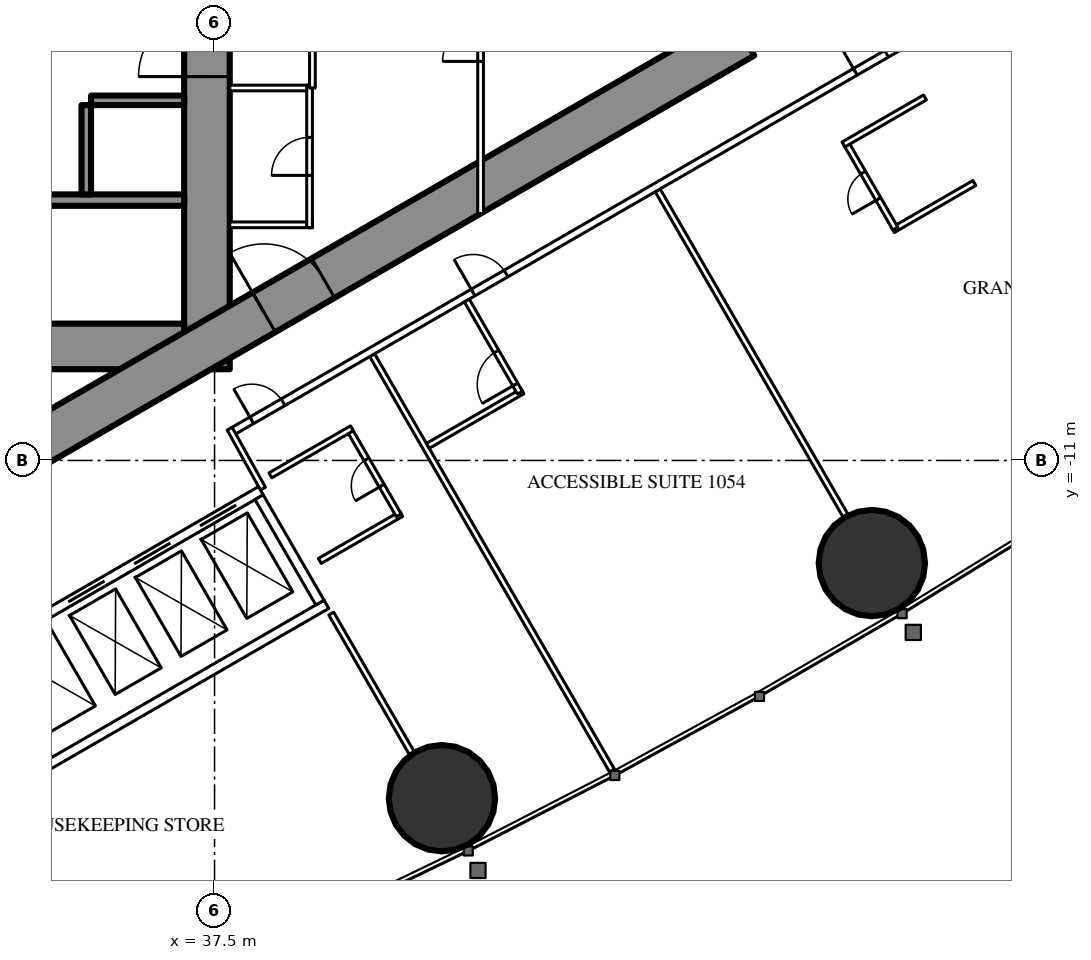
"""IFC4 building model, lengths in metres.
Left out: names, types, materials, properties, quantities, classifications, styles, units other than length and angle.
Written with IfcOpenShell. Run it as: python <this file> out.ifc"""

import sys

from ifc_helpers import new_model, si_unit, direction, frame, frame_2d, origin, origin_2d, place, context, subcontext, project, spatial, rectangle, hollow_circle, extrude, element, fill, save


model = new_model("IFC4")
c1 = context("Model", 3, precision=1e-05, world=origin(), true_north=direction((0.0, 1.0)))
c2 = subcontext(c1, "Body", "Model", "MODEL_VIEW")
j1 = project(units=[si_unit("LENGTHUNIT", "METRE"), si_unit("PLANEANGLEUNIT", "RADIAN")], contexts=[c1])
p1 = place(None, origin())
s1 = spatial("IfcSite", under=j1, at=p1, CompositionType="ELEMENT")
p2 = place(p1, origin())
s2 = spatial("IfcBuilding", under=s1, at=p2, CompositionType="ELEMENT")
p3 = place(p2, frame((0.0, 0.0, 42.5)))
s3 = spatial("IfcBuildingStorey", under=s2, at=p3, CompositionType="ELEMENT", Elevation=42.5)
for number, where, z_axis, x_axis in (
    (1, (43.484, -19.886, 0.0), (0.0, 0.0, 1.0), (1.0, 0.0, 0.0)),
    (2, (54.795, -13.701, 0.0), (0.0, 0.0, 1.0), (1.0, 0.0, 0.0)),
):
    element("IfcColumn", number, at=place(p3, frame(where, z_axis=z_axis, x_axis=x_axis)), inside=s3, PredefinedType="COLUMN", context=c2, shape_type="SweptSolid", body=[
        extrude(hollow_circle(Radius=1.4, WallThickness=0.12, at=origin_2d()), origin(), (0.0, 0.0, 1.0), 3.5),
    ])
p4 = place(p3, frame((37.3, -8.6, 0.0), z_axis=(0.0, 0.0, 1.0), x_axis=(0.0, 1.0, 0.0)))
e3 = element("IfcWall", 3, at=p4, inside=s3, PredefinedType="SHEAR", context=c2, shape_type="SweptSolid", body=[
    extrude(rectangle(XDim=17.2, YDim=1.2, at=frame_2d((8.6, 0.0))), origin(), (0.0, 0.0, 1.0), 3.5),
])
p5 = place(p4, frame((7.7, 0.0, 0.0)))
e4 = element("IfcOpeningElement", 4, at=p5, cuts=e3, PredefinedType="OPENING", context=c2, shape_type="SweptSolid", body=[
    extrude(rectangle(XDim=1.8, YDim=2.2, at=frame_2d((0.9, 1.1))), frame((0.0, 0.61, 0.0), z_axis=(0.0, -1.0, 0.0), x_axis=(1.0, 0.0, 0.0)), (0.0, 0.0, 1.0), 1.22),
])
p6 = place(p3, frame((28.3, -8.0, 0.0), z_axis=(0.0, 0.0, 1.0), x_axis=(1.0, 0.0, 0.0)))
e5 = element("IfcWall", 5, at=p6, inside=s3, PredefinedType="SHEAR", context=c2, shape_type="SweptSolid", body=[
    extrude(rectangle(XDim=8.4, YDim=1.2, at=frame_2d((4.2, 0.0))), origin(), (0.0, 0.0, 1.0), 3.5),
])
p7 = place(p6, frame((0.25, 0.0, 0.0)))
e6 = element("IfcOpeningElement", 6, at=p7, cuts=e5, PredefinedType="OPENING", context=c2, shape_type="SweptSolid", body=[
    extrude(rectangle(XDim=1.0, YDim=2.2, at=frame_2d((0.5, 1.1))), frame((0.0, 0.61, 0.0), z_axis=(0.0, -1.0, 0.0), x_axis=(1.0, 0.0, 0.0)), (0.0, 0.0, 1.0), 1.22),
])
p8 = place(p3, frame((28.3, -4.15, 0.0), z_axis=(0.0, 0.0, 1.0), x_axis=(1.0, 0.0, 0.0)))
e7 = element("IfcWall", 7, at=p8, inside=s3, PredefinedType="SHEAR", context=c2, shape_type="SweptSolid", body=[
    extrude(rectangle(XDim=8.4, YDim=0.3, at=frame_2d((4.2, 0.0))), origin(), (0.0, 0.0, 1.0), 3.5),
])
p9 = place(p3, frame((34.125, -4.0, 0.0), z_axis=(0.0, 0.0, 1.0), x_axis=(0.0, 1.0, 0.0)))
e8 = element("IfcWall", 8, at=p9, inside=s3, PredefinedType="SHEAR", context=c2, shape_type="SweptSolid", body=[
    extrude(rectangle(XDim=2.35, YDim=0.25, at=frame_2d((1.175, 0.0))), origin(), (0.0, 0.0, 1.0), 3.5),
])
p10 = place(p3, frame((34.25, -1.525, 0.0), z_axis=(0.0, 0.0, 1.0), x_axis=(1.0, 0.0, 0.0)))
e9 = element("IfcWall", 9, at=p10, inside=s3, PredefinedType="SHEAR", context=c2, shape_type="SweptSolid", body=[
    extrude(rectangle(XDim=2.45, YDim=0.25, at=frame_2d((1.225, 0.0))), origin(), (0.0, 0.0, 1.0), 3.5),
])
p11 = place(p3, frame((27.2, -13.8, 0.0), z_axis=(0.0, 0.0, 1.0), x_axis=(0.866027159892, 0.499996958321, 0.0)))
e10 = element("IfcWall", 10, at=p11, inside=s3, PredefinedType="SHEAR", context=c2, shape_type="SweptSolid", body=[
    extrude(rectangle(XDim=27.947, YDim=1.2, at=frame_2d((13.973, 0.0))), origin(), (0.0, 0.0, 1.0), 3.5),
])
p12 = place(p11, frame((4.6, 0.0, 0.0)))
e11 = element("IfcOpeningElement", 11, at=p12, cuts=e10, PredefinedType="OPENING", context=c2, shape_type="SweptSolid", body=[
    extrude(rectangle(XDim=1.0, YDim=2.2, at=frame_2d((0.5, 1.1))), frame((0.0, 0.61, 0.0), z_axis=(0.0, -1.0, 0.0), x_axis=(1.0, 0.0, 0.0)), (0.0, 0.0, 1.0), 1.22),
])
p13 = place(p11, frame((13.395, 0.0, 0.0)))
e12 = element("IfcOpeningElement", 12, at=p13, cuts=e10, PredefinedType="OPENING", context=c2, shape_type="SweptSolid", body=[
    extrude(rectangle(XDim=1.8, YDim=2.2, at=frame_2d((0.9, 1.1))), frame((0.0, 0.61, 0.0), z_axis=(0.0, -1.0, 0.0), x_axis=(1.0, 0.0, 0.0)), (0.0, 0.0, 1.0), 1.22),
])
p14 = place(p3, frame((41.647, -8.23, 0.0), z_axis=(0.0, 0.0, 1.0), x_axis=(0.49998590462, -0.866033541603, 0.0)))
e13 = element("IfcWall", 13, at=p14, inside=s3, PredefinedType="PARTITIONING", context=c2, shape_type="SweptSolid", body=[
    extrude(rectangle(XDim=12.621, YDim=0.15, at=frame_2d((6.311, 0.0))), origin(), (0.0, 0.0, 1.0), 3.25),
])
p15 = place(p3, frame((49.159, -3.893, 0.0), z_axis=(0.0, 0.0, 1.0), x_axis=(0.499998773722, -0.866026111775, 0.0)))
e14 = element("IfcWall", 14, at=p15, inside=s3, PredefinedType="PARTITIONING", context=c2, shape_type="SweptSolid", body=[
    extrude(rectangle(XDim=9.892, YDim=0.15, at=frame_2d((4.946, 0.0))), origin(), (0.0, 0.0, 1.0), 2.25),
])
p16 = place(p3, frame((40.57, -15.03, 0.0), z_axis=(0.0, 0.0, 1.0), x_axis=(0.500012993597, -0.866017901798, 0.0)))
e15 = element("IfcWall", 15, at=p16, inside=s3, PredefinedType="PARTITIONING", context=c2, shape_type="SweptSolid", body=[
    extrude(rectangle(XDim=4.243, YDim=0.15, at=frame_2d((2.122, 0.0))), origin(), (0.0, 0.0, 1.0), 3.25),
])
p17 = place(p3, frame((37.96, -10.243, 0.0), z_axis=(0.0, 0.0, 1.0), x_axis=(0.866026429433, 0.499998223521, 0.0)))
e16 = element("IfcWall", 16, at=p17, inside=s3, PredefinedType="PARTITIONING", context=c2, shape_type="SweptSolid", body=[
    extrude(rectangle(XDim=20.487, YDim=0.2, at=frame_2d((10.243, 0.0))), origin(), (0.0, 0.0, 1.0), 3.25),
])
p18 = place(p17, frame((7.325, 0.0, 0.0)))
e17 = element("IfcOpeningElement", 17, at=p18, cuts=e16, PredefinedType="OPENING", context=c2, shape_type="SweptSolid", body=[
    extrude(rectangle(XDim=1.0, YDim=2.2, at=frame_2d((0.5, 1.1))), frame((0.0, 0.11, 0.0), z_axis=(0.0, -1.0, 0.0), x_axis=(1.0, 0.0, 0.0)), (0.0, 0.0, 1.0), 0.22),
])
p19 = place(p17, frame((18.937, 0.0, 0.0)))
e18 = element("IfcOpeningElement", 18, at=p19, cuts=e16, PredefinedType="OPENING", context=c2, shape_type="SweptSolid", body=[
    extrude(rectangle(XDim=0.95, YDim=2.2, at=frame_2d((0.475, 1.1))), frame((0.0, 0.11, 0.0), z_axis=(0.0, -1.0, 0.0), x_axis=(1.0, 0.0, 0.0)), (0.0, 0.0, 1.0), 0.22),
])
p20 = place(p17, frame((0.6, 0.0, 0.0)))
e19 = element("IfcOpeningElement", 19, at=p20, cuts=e16, PredefinedType="OPENING", context=c2, shape_type="SweptSolid", body=[
    extrude(rectangle(XDim=0.95, YDim=2.2, at=frame_2d((0.475, 1.1))), frame((0.0, 0.11, 0.0), z_axis=(0.0, -1.0, 0.0), x_axis=(1.0, 0.0, 0.0)), (0.0, 0.0, 1.0), 0.22),
])
p21 = place(p3, frame((38.773, -11.742, 0.0), z_axis=(0.0, 0.0, 1.0), x_axis=(-0.485528096672, 0.8742210632, 0.0)))
e20 = element("IfcWall", 20, at=p21, inside=s3, PredefinedType="PARTITIONING", context=c2, shape_type="SweptSolid", body=[
    extrude(rectangle(XDim=1.805, YDim=0.15, at=frame_2d((0.903, 0.0))), origin(), (0.0, 0.0, 1.0), 3.25),
])
p22 = place(p3, frame((43.112, -10.617, 0.0), z_axis=(0.0, 0.0, 1.0), x_axis=(0.866018712932, 0.500011588718, 0.0)))
e21 = element("IfcWall", 21, at=p22, inside=s3, PredefinedType="PARTITIONING", context=c2, shape_type="SweptSolid", body=[
    extrude(rectangle(XDim=2.875, YDim=0.15, at=frame_2d((1.438, 0.0))), origin(), (0.0, 0.0, 1.0), 3.25),
])
p23 = place(p3, frame((44.137, -6.792, 0.0), z_axis=(0.0, 0.0, 1.0), x_axis=(0.49994636267, -0.866056369097, 0.0)))
e22 = element("IfcWall", 22, at=p23, inside=s3, PredefinedType="PARTITIONING", context=c2, shape_type="SweptSolid", body=[
    extrude(rectangle(XDim=2.8, YDim=0.15, at=frame_2d((1.4, 0.0))), origin(), (0.0, 0.0, 1.0), 3.25),
])
p24 = place(p23, frame((1.55, 0.0, 0.0)))
e23 = element("IfcOpeningElement", 23, at=p24, cuts=e22, PredefinedType="OPENING", context=c2, shape_type="SweptSolid", body=[
    extrude(rectangle(XDim=1.0, YDim=2.2, at=frame_2d((0.5, 1.1))), frame((0.0, 0.085, 0.0), z_axis=(0.0, -1.0, 0.0), x_axis=(1.0, 0.0, 0.0)), (0.0, 0.0, 1.0), 0.17),
])
p25 = place(p3, frame((55.349, -4.938, 0.0), z_axis=(0.0, 0.0, 1.0), x_axis=(0.866006523861, 0.500032699561, 0.0)))
e24 = element("IfcWall", 24, at=p25, inside=s3, PredefinedType="PARTITIONING", context=c2, shape_type="SweptSolid", body=[
    extrude(rectangle(XDim=2.475, YDim=0.15, at=frame_2d((1.237, 0.0))), origin(), (0.0, 0.0, 1.0), 3.25),
])
p26 = place(p3, frame((54.114, -2.649, 0.0), z_axis=(0.0, 0.0, 1.0), x_axis=(0.500006934395, -0.866021400173, 0.0)))
e25 = element("IfcWall", 25, at=p26, inside=s3, PredefinedType="PARTITIONING", context=c2, shape_type="SweptSolid", body=[
    extrude(rectangle(XDim=2.6, YDim=0.15, at=frame_2d((1.3, 0.0))), origin(), (0.0, 0.0, 1.0), 3.25),
])
p27 = place(p26, frame((0.9, 0.0, 0.0)))
e26 = element("IfcOpeningElement", 26, at=p27, cuts=e25, PredefinedType="OPENING", context=c2, shape_type="SweptSolid", body=[
    extrude(rectangle(XDim=0.8, YDim=2.2, at=frame_2d((0.4, 1.1))), frame((0.0, 0.085, 0.0), z_axis=(0.0, -1.0, 0.0), x_axis=(1.0, 0.0, 0.0)), (0.0, 0.0, 1.0), 0.17),
])
p28 = place(p3, frame((54.049, -2.687, 0.0), z_axis=(0.0, 0.0, 1.0), x_axis=(0.866006523861, 0.500032699561, 0.0)))
e27 = element("IfcWall", 27, at=p28, inside=s3, PredefinedType="PARTITIONING", context=c2, shape_type="SweptSolid", body=[
    extrude(rectangle(XDim=2.475, YDim=0.15, at=frame_2d((1.237, 0.0))), origin(), (0.0, 0.0, 1.0), 3.25),
])
p29 = place(p3, frame((40.27, -13.644, 0.0), z_axis=(0.0, 0.0, 1.0), x_axis=(0.866031185235, 0.4999899861, 0.0)))
e28 = element("IfcWall", 28, at=p29, inside=s3, PredefinedType="PARTITIONING", context=c2, shape_type="SweptSolid", body=[
    extrude(rectangle(XDim=2.475, YDim=0.15, at=frame_2d((1.238, 0.0))), origin(), (0.0, 0.0, 1.0), 3.25),
])
p30 = place(p3, frame((41.048, -10.193, 0.0), z_axis=(0.0, 0.0, 1.0), x_axis=(0.500047596559, -0.865997922154, 0.0)))
e29 = element("IfcWall", 29, at=p30, inside=s3, PredefinedType="PARTITIONING", context=c2, shape_type="SweptSolid", body=[
    extrude(rectangle(XDim=2.6, YDim=0.15, at=frame_2d((1.3, 0.0))), origin(), (0.0, 0.0, 1.0), 3.25),
])
p31 = place(p30, frame((0.9, 0.0, 0.0)))
e30 = element("IfcOpeningElement", 30, at=p31, cuts=e29, PredefinedType="OPENING", context=c2, shape_type="SweptSolid", body=[
    extrude(rectangle(XDim=0.8, YDim=2.2, at=frame_2d((0.4, 1.1))), frame((0.0, 0.085, 0.0), z_axis=(0.0, -1.0, 0.0), x_axis=(1.0, 0.0, 0.0)), (0.0, 0.0, 1.0), 0.17),
])
p32 = place(p3, frame((38.97, -11.393, 0.0), z_axis=(0.0, 0.0, 1.0), x_axis=(0.866031185235, 0.4999899861, 0.0)))
e31 = element("IfcWall", 31, at=p32, inside=s3, PredefinedType="PARTITIONING", context=c2, shape_type="SweptSolid", body=[
    extrude(rectangle(XDim=2.475, YDim=0.15, at=frame_2d((1.238, 0.0))), origin(), (0.0, 0.0, 1.0), 3.25),
])
for number, where, z_axis, x_axis in (
    (32, (37.9, -1.2, 0.0), (0.0, 0.0, 1.0), (1.0, 0.0, 0.0)),
    (33, (37.9, -4.8, 0.0), (0.0, 0.0, 1.0), (1.0, 0.0, 0.0)),
):
    element("IfcWall", number, at=place(p3, frame(where, z_axis=z_axis, x_axis=x_axis)), inside=s3, PredefinedType="PARTITIONING", context=c2, shape_type="SweptSolid", body=[
        extrude(rectangle(XDim=2.175, YDim=0.15, at=frame_2d((1.087, 0.0))), origin(), (0.0, 0.0, 1.0), 3.25),
    ])
p33 = place(p3, frame((40.0, -4.875, 0.0), z_axis=(0.0, 0.0, 1.0), x_axis=(0.0, 1.0, 0.0)))
e34 = element("IfcWall", 34, at=p33, inside=s3, PredefinedType="PARTITIONING", context=c2, shape_type="SweptSolid", body=[
    extrude(rectangle(XDim=3.75, YDim=0.15, at=frame_2d((1.875, 0.0))), origin(), (0.0, 0.0, 1.0), 3.25),
])
p34 = place(p33, frame((1.375, 0.0, 0.0)))
e35 = element("IfcOpeningElement", 35, at=p34, cuts=e34, PredefinedType="OPENING", context=c2, shape_type="SweptSolid", body=[
    extrude(rectangle(XDim=1.0, YDim=2.2, at=frame_2d((0.5, 1.1))), frame((0.0, 0.085, 0.0), z_axis=(0.0, -1.0, 0.0), x_axis=(1.0, 0.0, 0.0)), (0.0, 0.0, 1.0), 0.17),
])
p35 = place(p3, frame((40.075, -1.2, 0.0), z_axis=(0.0, 0.0, 1.0), x_axis=(0.0, 1.0, 0.0)))
e36 = element("IfcWall", 36, at=p35, inside=s3, PredefinedType="PARTITIONING", context=c2, shape_type="SweptSolid", body=[
    extrude(rectangle(XDim=6.874, YDim=0.15, at=frame_2d((3.437, 0.0))), origin(), (0.0, 0.0, 1.0), 3.25),
])
p36 = place(p35, frame((2.537, 0.0, 0.0)))
e37 = element("IfcOpeningElement", 37, at=p36, cuts=e36, PredefinedType="OPENING", context=c2, shape_type="SweptSolid", body=[
    extrude(rectangle(XDim=1.8, YDim=2.2, at=frame_2d((0.9, 1.1))), frame((0.0, 0.085, 0.0), z_axis=(0.0, -1.0, 0.0), x_axis=(1.0, 0.0, 0.0)), (0.0, 0.0, 1.0), 0.17),
])
p37 = place(p3, frame((44.5, -4.505, 0.0), z_axis=(0.0, 0.0, 1.0), x_axis=(0.0, 1.0, 0.0)))
e38 = element("IfcWall", 38, at=p37, inside=s3, PredefinedType="PARTITIONING", context=c2, shape_type="SweptSolid", body=[
    extrude(rectangle(XDim=9.009, YDim=0.15, at=frame_2d((4.505, 0.0))), origin(), (0.0, 0.0, 1.0), 2.45),
])
p38 = place(p37, frame((4.005, 0.0, 0.0)))
e39 = element("IfcOpeningElement", 39, at=p38, cuts=e38, PredefinedType="OPENING", context=c2, shape_type="SweptSolid", body=[
    extrude(rectangle(XDim=1.0, YDim=2.2, at=frame_2d((0.5, 1.1))), frame((0.0, 0.085, 0.0), z_axis=(0.0, -1.0, 0.0), x_axis=(1.0, 0.0, 0.0)), (0.0, 0.0, 1.0), 0.17),
])
p39 = place(p3, frame((31.271, -16.097, 0.0), z_axis=(0.0, 0.0, 1.0), x_axis=(0.86604045752, 0.499973925258, 0.0)))
e40 = element("IfcWall", 40, at=p39, inside=s3, PredefinedType="PARTITIONING", context=c2, shape_type="SweptSolid", body=[
    extrude(rectangle(XDim=8.6, YDim=0.25, at=frame_2d((4.3, 0.0))), origin(), (0.0, 0.0, 1.0), 3.25),
])
p40 = place(p39, frame((0.75, 0.0, 0.0)))
e41 = element("IfcOpeningElement", 41, at=p40, cuts=e40, PredefinedType="OPENING", context=c2, shape_type="SweptSolid", body=[
    extrude(rectangle(XDim=1.1, YDim=2.2, at=frame_2d((0.55, 1.1))), frame((0.0, 0.135, 0.0), z_axis=(0.0, -1.0, 0.0), x_axis=(1.0, 0.0, 0.0)), (0.0, 0.0, 1.0), 0.27),
])
p41 = place(p39, frame((2.75, 0.0, 0.0)))
e42 = element("IfcOpeningElement", 42, at=p41, cuts=e40, PredefinedType="OPENING", context=c2, shape_type="SweptSolid", body=[
    extrude(rectangle(XDim=1.1, YDim=2.2, at=frame_2d((0.55, 1.1))), frame((0.0, 0.135, 0.0), z_axis=(0.0, -1.0, 0.0), x_axis=(1.0, 0.0, 0.0)), (0.0, 0.0, 1.0), 0.27),
])
p42 = place(p39, frame((4.75, 0.0, 0.0)))
e43 = element("IfcOpeningElement", 43, at=p42, cuts=e40, PredefinedType="OPENING", context=c2, shape_type="SweptSolid", body=[
    extrude(rectangle(XDim=1.1, YDim=2.2, at=frame_2d((0.55, 1.1))), frame((0.0, 0.135, 0.0), z_axis=(0.0, -1.0, 0.0), x_axis=(1.0, 0.0, 0.0)), (0.0, 0.0, 1.0), 0.27),
])
p43 = place(p39, frame((6.75, 0.0, 0.0)))
e44 = element("IfcOpeningElement", 44, at=p43, cuts=e40, PredefinedType="OPENING", context=c2, shape_type="SweptSolid", body=[
    extrude(rectangle(XDim=1.1, YDim=2.2, at=frame_2d((0.55, 1.1))), frame((0.0, 0.135, 0.0), z_axis=(0.0, -1.0, 0.0), x_axis=(1.0, 0.0, 0.0)), (0.0, 0.0, 1.0), 0.27),
])
p44 = place(p3, frame((32.996, -19.086, 0.0), z_axis=(0.0, 0.0, 1.0), x_axis=(0.866028165386, 0.499995216735, 0.0)))
e45 = element("IfcWall", 45, at=p44, inside=s3, PredefinedType="PARTITIONING", context=c2, shape_type="SweptSolid", body=[
    extrude(rectangle(XDim=8.6, YDim=0.25, at=frame_2d((4.3, 0.0))), origin(), (0.0, 0.0, 1.0), 3.25),
])
p45 = place(p3, frame((38.673, -11.968, 0.0), z_axis=(0.0, 0.0, 1.0), x_axis=(0.499929347863, -0.866066190972, 0.0)))
e46 = element("IfcWall", 46, at=p45, inside=s3, PredefinedType="PARTITIONING", context=c2, shape_type="SweptSolid", body=[
    extrude(rectangle(XDim=3.201, YDim=0.25, at=frame_2d((1.6, 0.0))), origin(), (0.0, 0.0, 1.0), 3.25),
])
p46 = place(p24, origin())
e47 = element("IfcDoor", 47, at=p46, inside=s3, OperationType="SINGLE_SWING_RIGHT", PredefinedType="DOOR", context=c2, shape_type="SweptSolid", body=[
    extrude(rectangle(XDim=1.0, YDim=2.2, at=frame_2d((0.5, 1.1))), frame((0.0, 0.025, 0.0), z_axis=(0.0, -1.0, 0.0), x_axis=(1.0, 0.0, 0.0)), (0.0, 0.0, 1.0), 0.05),
])
fill(e23, e47)
p47 = place(p18, origin())
e48 = element("IfcDoor", 48, at=p47, inside=s3, OperationType="SINGLE_SWING_LEFT", PredefinedType="DOOR", context=c2, shape_type="SweptSolid", body=[
    extrude(rectangle(XDim=1.0, YDim=2.2, at=frame_2d((0.5, 1.1))), frame((0.0, 0.025, 0.0), z_axis=(0.0, -1.0, 0.0), x_axis=(1.0, 0.0, 0.0)), (0.0, 0.0, 1.0), 0.05),
])
fill(e17, e48)
p48 = place(p27, origin())
e49 = element("IfcDoor", 49, at=p48, inside=s3, OperationType="SINGLE_SWING_RIGHT", PredefinedType="DOOR", context=c2, shape_type="SweptSolid", body=[
    extrude(rectangle(XDim=0.8, YDim=2.2, at=frame_2d((0.4, 1.1))), frame((0.0, 0.025, 0.0), z_axis=(0.0, -1.0, 0.0), x_axis=(1.0, 0.0, 0.0)), (0.0, 0.0, 1.0), 0.05),
])
fill(e26, e49)
p49 = place(p19, origin())
e50 = element("IfcDoor", 50, at=p49, inside=s3, OperationType="SINGLE_SWING_LEFT", PredefinedType="DOOR", context=c2, shape_type="SweptSolid", body=[
    extrude(rectangle(XDim=0.95, YDim=2.2, at=frame_2d((0.475, 1.1))), frame((0.0, 0.025, 0.0), z_axis=(0.0, -1.0, 0.0), x_axis=(1.0, 0.0, 0.0)), (0.0, 0.0, 1.0), 0.05),
])
fill(e18, e50)
p50 = place(p31, origin())
e51 = element("IfcDoor", 51, at=p50, inside=s3, OperationType="SINGLE_SWING_RIGHT", PredefinedType="DOOR", context=c2, shape_type="SweptSolid", body=[
    extrude(rectangle(XDim=0.8, YDim=2.2, at=frame_2d((0.4, 1.1))), frame((0.0, 0.025, 0.0), z_axis=(0.0, -1.0, 0.0), x_axis=(1.0, 0.0, 0.0)), (0.0, 0.0, 1.0), 0.05),
])
fill(e30, e51)
p51 = place(p20, origin())
e52 = element("IfcDoor", 52, at=p51, inside=s3, OperationType="SINGLE_SWING_LEFT", PredefinedType="DOOR", context=c2, shape_type="SweptSolid", body=[
    extrude(rectangle(XDim=0.95, YDim=2.2, at=frame_2d((0.475, 1.1))), frame((0.0, 0.025, 0.0), z_axis=(0.0, -1.0, 0.0), x_axis=(1.0, 0.0, 0.0)), (0.0, 0.0, 1.0), 0.05),
])
fill(e19, e52)
p52 = place(p34, origin())
e53 = element("IfcDoor", 53, at=p52, inside=s3, OperationType="SINGLE_SWING_LEFT", PredefinedType="DOOR", context=c2, shape_type="SweptSolid", body=[
    extrude(rectangle(XDim=1.0, YDim=2.2, at=frame_2d((0.5, 1.1))), frame((0.0, 0.025, 0.0), z_axis=(0.0, -1.0, 0.0), x_axis=(1.0, 0.0, 0.0)), (0.0, 0.0, 1.0), 0.05),
])
fill(e35, e53)
p53 = place(p38, origin())
e54 = element("IfcDoor", 54, at=p53, inside=s3, OperationType="SINGLE_SWING_LEFT", PredefinedType="DOOR", context=c2, shape_type="SweptSolid", body=[
    extrude(rectangle(XDim=1.0, YDim=2.2, at=frame_2d((0.5, 1.1))), frame((0.0, 0.025, 0.0), z_axis=(0.0, -1.0, 0.0), x_axis=(1.0, 0.0, 0.0)), (0.0, 0.0, 1.0), 0.05),
])
fill(e39, e54)
p54 = place(p13, origin())
e55 = element("IfcDoor", 55, at=p54, inside=s3, OperationType="DOUBLE_DOOR_SINGLE_SWING", PredefinedType="DOOR", context=c2, shape_type="SweptSolid", body=[
    extrude(rectangle(XDim=1.8, YDim=2.2, at=frame_2d((0.9, 1.1))), frame((0.0, 0.025, 0.0), z_axis=(0.0, -1.0, 0.0), x_axis=(1.0, 0.0, 0.0)), (0.0, 0.0, 1.0), 0.05),
])
fill(e12, e55)
p55 = place(p5, origin())
e56 = element("IfcDoor", 56, at=p55, inside=s3, OperationType="DOUBLE_DOOR_SINGLE_SWING", PredefinedType="DOOR", context=c2, shape_type="SweptSolid", body=[
    extrude(rectangle(XDim=1.8, YDim=2.2, at=frame_2d((0.9, 1.1))), frame((0.0, 0.025, 0.0), z_axis=(0.0, -1.0, 0.0), x_axis=(1.0, 0.0, 0.0)), (0.0, 0.0, 1.0), 0.05),
])
fill(e4, e56)
p56 = place(p41, origin())
e57 = element("IfcDoor", 57, at=p56, inside=s3, OperationType="DOUBLE_DOOR_SLIDING", PredefinedType="USERDEFINED", context=c2, shape_type="SweptSolid", body=[
    extrude(rectangle(XDim=1.1, YDim=2.2, at=frame_2d((0.55, 1.1))), frame((0.0, 0.025, 0.0), z_axis=(0.0, -1.0, 0.0), x_axis=(1.0, 0.0, 0.0)), (0.0, 0.0, 1.0), 0.05),
])
fill(e42, e57)
p57 = place(p42, origin())
e58 = element("IfcDoor", 58, at=p57, inside=s3, OperationType="DOUBLE_DOOR_SLIDING", PredefinedType="USERDEFINED", context=c2, shape_type="SweptSolid", body=[
    extrude(rectangle(XDim=1.1, YDim=2.2, at=frame_2d((0.55, 1.1))), frame((0.0, 0.025, 0.0), z_axis=(0.0, -1.0, 0.0), x_axis=(1.0, 0.0, 0.0)), (0.0, 0.0, 1.0), 0.05),
])
fill(e43, e58)
p58 = place(p43, origin())
e59 = element("IfcDoor", 59, at=p58, inside=s3, OperationType="DOUBLE_DOOR_SLIDING", PredefinedType="USERDEFINED", context=c2, shape_type="SweptSolid", body=[
    extrude(rectangle(XDim=1.1, YDim=2.2, at=frame_2d((0.55, 1.1))), frame((0.0, 0.025, 0.0), z_axis=(0.0, -1.0, 0.0), x_axis=(1.0, 0.0, 0.0)), (0.0, 0.0, 1.0), 0.05),
])
fill(e44, e59)
save(model, sys.argv[1])
